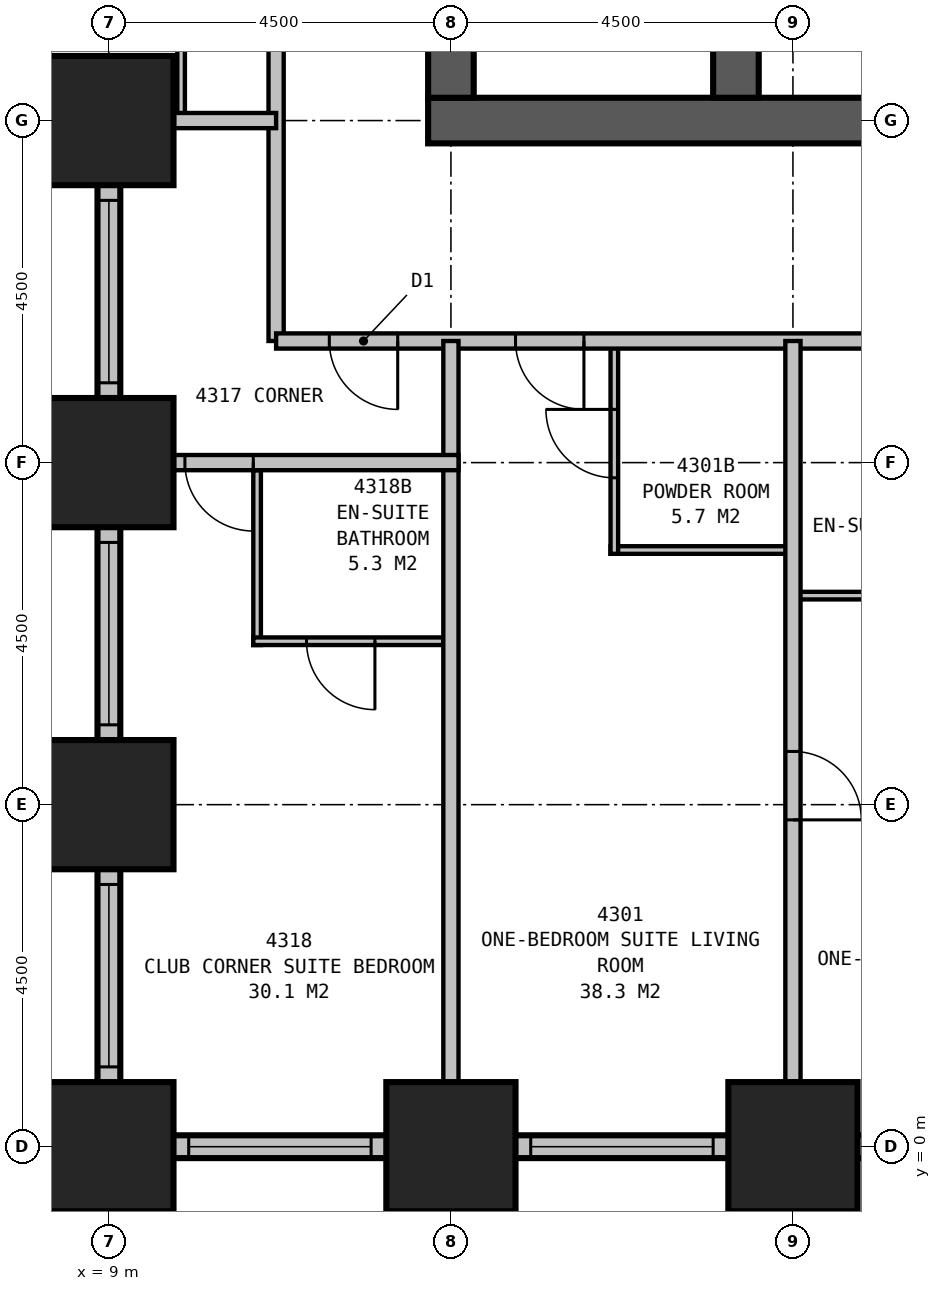
"""IFC4 building model, lengths in metres.
Left out: names, types, materials, properties, quantities, classifications, styles, units other than length and angle.
Written with IfcOpenShell. Run it as: python <this file> out.ifc"""

import sys

from ifc_helpers import new_model, si_unit, direction, frame, frame_2d, origin, origin_2d, place, context, subcontext, project, spatial, rectangle, extrude, element, fill, save


model = new_model("IFC4")
c1 = context("Model", 3, precision=1e-05, world=origin(), true_north=direction((0.0, 1.0)))
c2 = subcontext(c1, "Body", "Model", "MODEL_VIEW")
j1 = project(units=[si_unit("LENGTHUNIT", "METRE"), si_unit("PLANEANGLEUNIT", "RADIAN")], contexts=[c1])
p1 = place(None, origin())
s1 = spatial("IfcSite", under=j1, at=p1, CompositionType="ELEMENT")
p2 = place(p1, origin())
s2 = spatial("IfcBuilding", under=s1, at=p2, CompositionType="ELEMENT")
p3 = place(p2, frame((0.0, 0.0, 169.4)))
s3 = spatial("IfcBuildingStorey", under=s2, at=p3, CompositionType="ELEMENT", Elevation=169.4)
for number, where, z_axis, x_axis in (
    (1, (9.0, 13.5, 0.0), (0.0, 0.0, 1.0), (1.0, 0.0, 0.0)),
    (2, (9.0, 9.0, 0.0), (0.0, 0.0, 1.0), (1.0, 0.0, 0.0)),
    (3, (9.0, 4.5, 0.0), (0.0, 0.0, 1.0), (1.0, 0.0, 0.0)),
    (4, (9.0, 0.0, 0.0), (0.0, 0.0, 1.0), (1.0, 0.0, 0.0)),
    (5, (13.5, 0.0, 0.0), (0.0, 0.0, 1.0), (1.0, 0.0, 0.0)),
    (6, (18.0, 0.0, 0.0), (0.0, 0.0, 1.0), (1.0, 0.0, 0.0)),
):
    element("IfcColumn", number, at=place(p3, frame(where, z_axis=z_axis, x_axis=x_axis)), inside=s3, PredefinedType="COLUMN", context=c2, shape_type="SweptSolid", body=[
        extrude(rectangle(XDim=1.7, YDim=1.7, at=origin_2d()), origin(), (0.0, 0.0, 1.0), 3.5),
    ])
p4 = place(p3, frame((13.2, 13.5, 0.0), z_axis=(0.0, 0.0, 1.0), x_axis=(1.0, 0.0, 0.0)))
e7 = element("IfcWall", 7, at=p4, inside=s3, PredefinedType="SHEAR", context=c2, shape_type="SweptSolid", body=[
    extrude(rectangle(XDim=23.1, YDim=0.6, at=frame_2d((11.55, 0.0))), origin(), (0.0, 0.0, 1.0), 3.5),
])
p5 = place(p3, frame((17.25, 13.8, 0.0), z_axis=(0.0, 0.0, 1.0), x_axis=(0.0, 1.0, 0.0)))
e8 = element("IfcWall", 8, at=p5, inside=s3, PredefinedType="SHEAR", context=c2, shape_type="SweptSolid", body=[
    extrude(rectangle(XDim=12.9, YDim=0.6, at=frame_2d((6.45, 0.0))), origin(), (0.0, 0.0, 1.0), 3.5),
])
p6 = place(p5, frame((3.85, 0.0, 0.0)))
e9 = element("IfcOpeningElement", 9, at=p6, cuts=e8, PredefinedType="OPENING", context=c2, shape_type="SweptSolid", body=[
    extrude(rectangle(XDim=1.2, YDim=2.1, at=frame_2d((0.6, 1.05))), frame((0.0, 0.31, 0.0), z_axis=(0.0, -1.0, 0.0), x_axis=(1.0, 0.0, 0.0)), (0.0, 0.0, 1.0), 0.62),
])
p7 = place(p3, frame((13.5, 16.5, 0.0), z_axis=(0.0, 0.0, 1.0), x_axis=(0.0, -1.0, 0.0)))
e10 = element("IfcWall", 10, at=p7, inside=s3, PredefinedType="SHEAR", context=c2, shape_type="SweptSolid", body=[
    extrude(rectangle(XDim=2.7, YDim=0.6, at=frame_2d((1.35, 0.0))), origin(), (0.0, 0.0, 1.0), 3.5),
])
p8 = place(p3, frame((1.35, 13.5, 0.0), z_axis=(0.0, 0.0, 1.0), x_axis=(1.0, 0.0, 0.0)))
e11 = element("IfcWall", 11, at=p8, inside=s3, PredefinedType="STANDARD", context=c2, shape_type="SweptSolid", body=[
    extrude(rectangle(XDim=7.8, YDim=0.3, at=frame_2d((3.9, 0.0))), origin(), (0.0, 0.0, 1.0), 2.25),
])
p9 = place(p8, frame((1.2, 0.0, 0.5)))
e12 = element("IfcOpeningElement", 12, at=p9, cuts=e11, PredefinedType="OPENING", context=c2, shape_type="SweptSolid", body=[
    extrude(rectangle(XDim=0.9, YDim=1.6, at=frame_2d((0.45, 0.8))), frame((0.0, 0.16, 0.0), z_axis=(0.0, -1.0, 0.0), x_axis=(1.0, 0.0, 0.0)), (0.0, 0.0, 1.0), 0.32),
])
p10 = place(p3, frame((9.0, 13.65, 0.0), z_axis=(0.0, 0.0, 1.0), x_axis=(0.0, -1.0, 0.0)))
e13 = element("IfcWall", 13, at=p10, inside=s3, PredefinedType="STANDARD", context=c2, shape_type="SweptSolid", body=[
    extrude(rectangle(XDim=13.8, YDim=0.3, at=frame_2d((6.9, 0.0))), origin(), (0.0, 0.0, 1.0), 2.25),
])
p11 = place(p10, frame((1.2, 0.0, 0.5)))
e14 = element("IfcOpeningElement", 14, at=p11, cuts=e13, PredefinedType="OPENING", context=c2, shape_type="SweptSolid", body=[
    extrude(rectangle(XDim=2.4, YDim=1.6, at=frame_2d((1.2, 0.8))), frame((0.0, 0.16, 0.0), z_axis=(0.0, -1.0, 0.0), x_axis=(1.0, 0.0, 0.0)), (0.0, 0.0, 1.0), 0.32),
])
p12 = place(p10, frame((5.7, 0.0, 0.5)))
e15 = element("IfcOpeningElement", 15, at=p12, cuts=e13, PredefinedType="OPENING", context=c2, shape_type="SweptSolid", body=[
    extrude(rectangle(XDim=2.4, YDim=1.6, at=frame_2d((1.2, 0.8))), frame((0.0, 0.16, 0.0), z_axis=(0.0, -1.0, 0.0), x_axis=(1.0, 0.0, 0.0)), (0.0, 0.0, 1.0), 0.32),
])
p13 = place(p10, frame((10.2, 0.0, 0.5)))
e16 = element("IfcOpeningElement", 16, at=p13, cuts=e13, PredefinedType="OPENING", context=c2, shape_type="SweptSolid", body=[
    extrude(rectangle(XDim=2.4, YDim=1.6, at=frame_2d((1.2, 0.8))), frame((0.0, 0.16, 0.0), z_axis=(0.0, -1.0, 0.0), x_axis=(1.0, 0.0, 0.0)), (0.0, 0.0, 1.0), 0.32),
])
p14 = place(p3, frame((8.85, 0.0, 0.0), z_axis=(0.0, 0.0, 1.0), x_axis=(1.0, 0.0, 0.0)))
e17 = element("IfcWall", 17, at=p14, inside=s3, PredefinedType="STANDARD", context=c2, shape_type="SweptSolid", body=[
    extrude(rectangle(XDim=36.3, YDim=0.3, at=frame_2d((18.15, 0.0))), origin(), (0.0, 0.0, 1.0), 2.25),
])
p15 = place(p14, frame((1.2, 0.0, 0.5)))
e18 = element("IfcOpeningElement", 18, at=p15, cuts=e17, PredefinedType="OPENING", context=c2, shape_type="SweptSolid", body=[
    extrude(rectangle(XDim=2.4, YDim=1.6, at=frame_2d((1.2, 0.8))), frame((0.0, 0.16, 0.0), z_axis=(0.0, -1.0, 0.0), x_axis=(1.0, 0.0, 0.0)), (0.0, 0.0, 1.0), 0.32),
])
p16 = place(p14, frame((5.7, 0.0, 0.5)))
e19 = element("IfcOpeningElement", 19, at=p16, cuts=e17, PredefinedType="OPENING", context=c2, shape_type="SweptSolid", body=[
    extrude(rectangle(XDim=2.4, YDim=1.6, at=frame_2d((1.2, 0.8))), frame((0.0, 0.16, 0.0), z_axis=(0.0, -1.0, 0.0), x_axis=(1.0, 0.0, 0.0)), (0.0, 0.0, 1.0), 0.32),
])
p17 = place(p14, frame((10.2, 0.0, 0.5)))
e20 = element("IfcOpeningElement", 20, at=p17, cuts=e17, PredefinedType="OPENING", context=c2, shape_type="SweptSolid", body=[
    extrude(rectangle(XDim=2.4, YDim=1.6, at=frame_2d((1.2, 0.8))), frame((0.0, 0.16, 0.0), z_axis=(0.0, -1.0, 0.0), x_axis=(1.0, 0.0, 0.0)), (0.0, 0.0, 1.0), 0.32),
])
p18 = place(p14, frame((14.7, 0.0, 0.5)))
e21 = element("IfcOpeningElement", 21, at=p18, cuts=e17, PredefinedType="OPENING", context=c2, shape_type="SweptSolid", body=[
    extrude(rectangle(XDim=2.4, YDim=1.6, at=frame_2d((1.2, 0.8))), frame((0.0, 0.16, 0.0), z_axis=(0.0, -1.0, 0.0), x_axis=(1.0, 0.0, 0.0)), (0.0, 0.0, 1.0), 0.32),
])
p19 = place(p14, frame((19.2, 0.0, 0.5)))
e22 = element("IfcOpeningElement", 22, at=p19, cuts=e17, PredefinedType="OPENING", context=c2, shape_type="SweptSolid", body=[
    extrude(rectangle(XDim=2.4, YDim=1.6, at=frame_2d((1.2, 0.8))), frame((0.0, 0.16, 0.0), z_axis=(0.0, -1.0, 0.0), x_axis=(1.0, 0.0, 0.0)), (0.0, 0.0, 1.0), 0.32),
])
p20 = place(p14, frame((23.7, 0.0, 0.5)))
e23 = element("IfcOpeningElement", 23, at=p20, cuts=e17, PredefinedType="OPENING", context=c2, shape_type="SweptSolid", body=[
    extrude(rectangle(XDim=2.4, YDim=1.6, at=frame_2d((1.2, 0.8))), frame((0.0, 0.16, 0.0), z_axis=(0.0, -1.0, 0.0), x_axis=(1.0, 0.0, 0.0)), (0.0, 0.0, 1.0), 0.32),
])
p21 = place(p14, frame((28.2, 0.0, 0.5)))
e24 = element("IfcOpeningElement", 24, at=p21, cuts=e17, PredefinedType="OPENING", context=c2, shape_type="SweptSolid", body=[
    extrude(rectangle(XDim=2.4, YDim=1.6, at=frame_2d((1.2, 0.8))), frame((0.0, 0.16, 0.0), z_axis=(0.0, -1.0, 0.0), x_axis=(1.0, 0.0, 0.0)), (0.0, 0.0, 1.0), 0.32),
])
p22 = place(p14, frame((32.7, 0.0, 0.5)))
e25 = element("IfcOpeningElement", 25, at=p22, cuts=e17, PredefinedType="OPENING", context=c2, shape_type="SweptSolid", body=[
    extrude(rectangle(XDim=2.4, YDim=1.6, at=frame_2d((1.2, 0.8))), frame((0.0, 0.16, 0.0), z_axis=(0.0, -1.0, 0.0), x_axis=(1.0, 0.0, 0.0)), (0.0, 0.0, 1.0), 0.32),
])
p23 = place(p3, frame((11.2, 10.6, 0.0), z_axis=(0.0, 0.0, 1.0), x_axis=(1.0, 0.0, 0.0)))
e26 = element("IfcWall", 26, at=p23, inside=s3, PredefinedType="PARTITIONING", context=c2, shape_type="SweptSolid", body=[
    extrude(rectangle(XDim=27.1, YDim=0.2, at=frame_2d((13.55, 0.0))), origin(), (0.0, 0.0, 1.0), 3.25),
])
p24 = place(p23, frame((4.05, 0.0, 0.0), z_axis=(0.0, 0.0, 1.0), x_axis=(-1.0, 0.0, 0.0)))
e27 = element("IfcOpeningElement", 27, at=p24, cuts=e26, PredefinedType="OPENING", context=c2, shape_type="SweptSolid", body=[
    extrude(rectangle(XDim=0.9, YDim=2.1, at=frame_2d((0.45, 1.05))), frame((0.0, 0.11, 0.0), z_axis=(0.0, -1.0, 0.0), x_axis=(1.0, 0.0, 0.0)), (0.0, 0.0, 1.0), 0.22),
])
p25 = place(p23, frame((12.65, 0.0, 0.0), z_axis=(0.0, 0.0, 1.0), x_axis=(-1.0, 0.0, 0.0)))
e28 = element("IfcOpeningElement", 28, at=p25, cuts=e26, PredefinedType="OPENING", context=c2, shape_type="SweptSolid", body=[
    extrude(rectangle(XDim=1.0, YDim=2.1, at=frame_2d((0.5, 1.05))), frame((0.0, 0.11, 0.0), z_axis=(0.0, -1.0, 0.0), x_axis=(1.0, 0.0, 0.0)), (0.0, 0.0, 1.0), 0.22),
])
p26 = place(p23, frame((17.55, 0.0, 0.0), z_axis=(0.0, 0.0, 1.0), x_axis=(-1.0, 0.0, 0.0)))
e29 = element("IfcOpeningElement", 29, at=p26, cuts=e26, PredefinedType="OPENING", context=c2, shape_type="SweptSolid", body=[
    extrude(rectangle(XDim=0.9, YDim=2.1, at=frame_2d((0.45, 1.05))), frame((0.0, 0.11, 0.0), z_axis=(0.0, -1.0, 0.0), x_axis=(1.0, 0.0, 0.0)), (0.0, 0.0, 1.0), 0.22),
])
p27 = place(p23, frame((1.6, 0.0, 0.0), z_axis=(0.0, 0.0, 1.0), x_axis=(-1.0, 0.0, 0.0)))
e30 = element("IfcOpeningElement", 30, at=p27, cuts=e26, PredefinedType="OPENING", context=c2, shape_type="SweptSolid", body=[
    extrude(rectangle(XDim=0.9, YDim=2.1, at=frame_2d((0.45, 1.05))), frame((0.0, 0.11, 0.0), z_axis=(0.0, -1.0, 0.0), x_axis=(1.0, 0.0, 0.0)), (0.0, 0.0, 1.0), 0.22),
])
p28 = place(p23, frame((26.4, 0.0, 0.0), z_axis=(0.0, 0.0, 1.0), x_axis=(-1.0, 0.0, 0.0)))
e31 = element("IfcOpeningElement", 31, at=p28, cuts=e26, PredefinedType="OPENING", context=c2, shape_type="SweptSolid", body=[
    extrude(rectangle(XDim=0.9, YDim=2.1, at=frame_2d((0.45, 1.05))), frame((0.0, 0.11, 0.0), z_axis=(0.0, -1.0, 0.0), x_axis=(1.0, 0.0, 0.0)), (0.0, 0.0, 1.0), 0.22),
])
p29 = place(p3, frame((11.2, 10.6, 0.0), z_axis=(0.0, 0.0, 1.0), x_axis=(0.0, 1.0, 0.0)))
e32 = element("IfcWall", 32, at=p29, inside=s3, PredefinedType="PARTITIONING", context=c2, shape_type="SweptSolid", body=[
    extrude(rectangle(XDim=18.7, YDim=0.2, at=frame_2d((9.35, 0.0))), origin(), (0.0, 0.0, 1.0), 3.25),
])
p30 = place(p29, frame((6.05, 0.0, 0.0)))
e33 = element("IfcOpeningElement", 33, at=p30, cuts=e32, PredefinedType="OPENING", context=c2, shape_type="SweptSolid", body=[
    extrude(rectangle(XDim=0.9, YDim=2.1, at=frame_2d((0.45, 1.05))), frame((0.0, 0.11, 0.0), z_axis=(0.0, -1.0, 0.0), x_axis=(1.0, 0.0, 0.0)), (0.0, 0.0, 1.0), 0.22),
])
p31 = place(p29, frame((10.55, 0.0, 0.0)))
e34 = element("IfcOpeningElement", 34, at=p31, cuts=e32, PredefinedType="OPENING", context=c2, shape_type="SweptSolid", body=[
    extrude(rectangle(XDim=0.9, YDim=2.1, at=frame_2d((0.45, 1.05))), frame((0.0, 0.11, 0.0), z_axis=(0.0, -1.0, 0.0), x_axis=(1.0, 0.0, 0.0)), (0.0, 0.0, 1.0), 0.22),
])
p32 = place(p29, frame((14.65, 0.0, 0.0)))
e35 = element("IfcOpeningElement", 35, at=p32, cuts=e32, PredefinedType="OPENING", context=c2, shape_type="SweptSolid", body=[
    extrude(rectangle(XDim=1.0, YDim=2.1, at=frame_2d((0.5, 1.05))), frame((0.0, 0.11, 0.0), z_axis=(0.0, -1.0, 0.0), x_axis=(1.0, 0.0, 0.0)), (0.0, 0.0, 1.0), 0.22),
])
p33 = place(p3, frame((18.0, 10.6, 0.0), z_axis=(0.0, 0.0, 1.0), x_axis=(0.0, -1.0, 0.0)))
e36 = element("IfcWall", 36, at=p33, inside=s3, PredefinedType="PARTITIONING", context=c2, shape_type="SweptSolid", body=[
    extrude(rectangle(XDim=10.6, YDim=0.2, at=frame_2d((5.3, 0.0))), origin(), (0.0, 0.0, 1.0), 2.25),
])
p34 = place(p33, frame((5.4, 0.0, 0.0)))
e37 = element("IfcOpeningElement", 37, at=p34, cuts=e36, PredefinedType="OPENING", context=c2, shape_type="SweptSolid", body=[
    extrude(rectangle(XDim=0.9, YDim=2.1, at=frame_2d((0.45, 1.05))), frame((0.0, 0.11, 0.0), z_axis=(0.0, -1.0, 0.0), x_axis=(1.0, 0.0, 0.0)), (0.0, 0.0, 1.0), 0.22),
])
p35 = place(p3, frame((15.6, 7.85, 0.0), z_axis=(0.0, 0.0, 1.0), x_axis=(1.0, 0.0, 0.0)))
e38 = element("IfcWall", 38, at=p35, inside=s3, PredefinedType="PLUMBINGWALL", context=c2, shape_type="SweptSolid", body=[
    extrude(rectangle(XDim=2.4, YDim=0.1, at=frame_2d((1.2, 0.0))), origin(), (0.0, 0.0, 1.0), 3.25),
])
p36 = place(p3, frame((15.65, 10.6, 0.0), z_axis=(0.0, 0.0, 1.0), x_axis=(0.0, -1.0, 0.0)))
e39 = element("IfcWall", 39, at=p36, inside=s3, PredefinedType="PLUMBINGWALL", context=c2, shape_type="SweptSolid", body=[
    extrude(rectangle(XDim=2.8, YDim=0.1, at=frame_2d((1.4, 0.0))), origin(), (0.0, 0.0, 1.0), 3.25),
])
p37 = place(p36, frame((1.8, 0.0, 0.0), z_axis=(0.0, 0.0, 1.0), x_axis=(-1.0, 0.0, 0.0)))
e40 = element("IfcOpeningElement", 40, at=p37, cuts=e39, PredefinedType="OPENING", context=c2, shape_type="SweptSolid", body=[
    extrude(rectangle(XDim=0.9, YDim=2.1, at=frame_2d((0.45, 1.05))), frame((0.0, 0.06, 0.0), z_axis=(0.0, -1.0, 0.0), x_axis=(1.0, 0.0, 0.0)), (0.0, 0.0, 1.0), 0.12),
])
p38 = place(p3, frame((18.0, 7.25, 0.0), z_axis=(0.0, 0.0, 1.0), x_axis=(1.0, 0.0, 0.0)))
e41 = element("IfcWall", 41, at=p38, inside=s3, PredefinedType="PLUMBINGWALL", context=c2, shape_type="SweptSolid", body=[
    extrude(rectangle(XDim=3.15, YDim=0.1, at=frame_2d((1.575, 0.0))), origin(), (0.0, 0.0, 1.0), 3.25),
])
p39 = place(p3, frame((9.95, 13.5, 0.0), z_axis=(0.0, 0.0, 1.0), x_axis=(0.0, 1.0, 0.0)))
e42 = element("IfcWall", 42, at=p39, inside=s3, PredefinedType="PLUMBINGWALL", context=c2, shape_type="SweptSolid", body=[
    extrude(rectangle(XDim=2.8, YDim=0.1, at=frame_2d((1.4, 0.0))), origin(), (0.0, 0.0, 1.0), 3.25),
])
p40 = place(p3, frame((11.2, 13.5, 0.0), z_axis=(0.0, 0.0, 1.0), x_axis=(-1.0, 0.0, 0.0)))
e43 = element("IfcWall", 43, at=p40, inside=s3, PredefinedType="PARTITIONING", context=c2, shape_type="SweptSolid", body=[
    extrude(rectangle(XDim=2.2, YDim=0.2, at=frame_2d((1.1, 0.0))), origin(), (0.0, 0.0, 1.0), 1.95),
])
p41 = place(p3, frame((13.5, 10.6, 0.0), z_axis=(0.0, 0.0, 1.0), x_axis=(0.0, -1.0, 0.0)))
e44 = element("IfcWall", 44, at=p41, inside=s3, PredefinedType="PARTITIONING", context=c2, shape_type="SweptSolid", body=[
    extrude(rectangle(XDim=10.6, YDim=0.2, at=frame_2d((5.3, 0.0))), origin(), (0.0, 0.0, 1.0), 2.25),
])
p42 = place(p3, frame((13.6, 9.0, 0.0), z_axis=(0.0, 0.0, 1.0), x_axis=(-1.0, 0.0, 0.0)))
e45 = element("IfcWall", 45, at=p42, inside=s3, PredefinedType="PARTITIONING", context=c2, shape_type="SweptSolid", body=[
    extrude(rectangle(XDim=4.6, YDim=0.2, at=frame_2d((2.3, 0.0))), origin(), (0.0, 0.0, 1.0), 3.25),
])
p43 = place(p42, frame((2.7, 0.0, 0.0)))
e46 = element("IfcOpeningElement", 46, at=p43, cuts=e45, PredefinedType="OPENING", context=c2, shape_type="SweptSolid", body=[
    extrude(rectangle(XDim=0.9, YDim=2.1, at=frame_2d((0.45, 1.05))), frame((0.0, 0.11, 0.0), z_axis=(0.0, -1.0, 0.0), x_axis=(1.0, 0.0, 0.0)), (0.0, 0.0, 1.0), 0.22),
])
p44 = place(p3, frame((10.95, 8.9, 0.0), z_axis=(0.0, 0.0, 1.0), x_axis=(0.0, -1.0, 0.0)))
e47 = element("IfcWall", 47, at=p44, inside=s3, PredefinedType="PLUMBINGWALL", context=c2, shape_type="SweptSolid", body=[
    extrude(rectangle(XDim=2.3, YDim=0.1, at=frame_2d((1.15, 0.0))), origin(), (0.0, 0.0, 1.0), 3.25),
])
p45 = place(p3, frame((13.4, 6.65, 0.0), z_axis=(0.0, 0.0, 1.0), x_axis=(-1.0, 0.0, 0.0)))
e48 = element("IfcWall", 48, at=p45, inside=s3, PredefinedType="PLUMBINGWALL", context=c2, shape_type="SweptSolid", body=[
    extrude(rectangle(XDim=2.5, YDim=0.1, at=frame_2d((1.25, 0.0))), origin(), (0.0, 0.0, 1.0), 3.25),
])
p46 = place(p45, frame((0.9, 0.0, 0.0)))
e49 = element("IfcOpeningElement", 49, at=p46, cuts=e48, PredefinedType="OPENING", context=c2, shape_type="SweptSolid", body=[
    extrude(rectangle(XDim=0.9, YDim=2.1, at=frame_2d((0.45, 1.05))), frame((0.0, 0.06, 0.0), z_axis=(0.0, -1.0, 0.0), x_axis=(1.0, 0.0, 0.0)), (0.0, 0.0, 1.0), 0.12),
])
p47 = place(p11, origin())
e50 = element("IfcWindow", 50, at=p47, inside=s3, PartitioningType="SINGLE_PANEL", PredefinedType="WINDOW", context=c2, shape_type="SweptSolid", body=[
    extrude(rectangle(XDim=2.4, YDim=1.6, at=frame_2d((1.2, 0.8))), frame((0.0, 0.03, 0.0), z_axis=(0.0, -1.0, 0.0), x_axis=(1.0, 0.0, 0.0)), (0.0, 0.0, 1.0), 0.06),
])
fill(e14, e50)
p48 = place(p12, origin())
e51 = element("IfcWindow", 51, at=p48, inside=s3, PartitioningType="SINGLE_PANEL", PredefinedType="WINDOW", context=c2, shape_type="SweptSolid", body=[
    extrude(rectangle(XDim=2.4, YDim=1.6, at=frame_2d((1.2, 0.8))), frame((0.0, 0.03, 0.0), z_axis=(0.0, -1.0, 0.0), x_axis=(1.0, 0.0, 0.0)), (0.0, 0.0, 1.0), 0.06),
])
fill(e15, e51)
p49 = place(p13, origin())
e52 = element("IfcWindow", 52, at=p49, inside=s3, PartitioningType="SINGLE_PANEL", PredefinedType="WINDOW", context=c2, shape_type="SweptSolid", body=[
    extrude(rectangle(XDim=2.4, YDim=1.6, at=frame_2d((1.2, 0.8))), frame((0.0, 0.03, 0.0), z_axis=(0.0, -1.0, 0.0), x_axis=(1.0, 0.0, 0.0)), (0.0, 0.0, 1.0), 0.06),
])
fill(e16, e52)
p50 = place(p15, origin())
e53 = element("IfcWindow", 53, at=p50, inside=s3, PartitioningType="SINGLE_PANEL", PredefinedType="WINDOW", context=c2, shape_type="SweptSolid", body=[
    extrude(rectangle(XDim=2.4, YDim=1.6, at=frame_2d((1.2, 0.8))), frame((0.0, 0.03, 0.0), z_axis=(0.0, -1.0, 0.0), x_axis=(1.0, 0.0, 0.0)), (0.0, 0.0, 1.0), 0.06),
])
fill(e18, e53)
p51 = place(p16, origin())
e54 = element("IfcWindow", 54, at=p51, inside=s3, PartitioningType="SINGLE_PANEL", PredefinedType="WINDOW", context=c2, shape_type="SweptSolid", body=[
    extrude(rectangle(XDim=2.4, YDim=1.6, at=frame_2d((1.2, 0.8))), frame((0.0, 0.03, 0.0), z_axis=(0.0, -1.0, 0.0), x_axis=(1.0, 0.0, 0.0)), (0.0, 0.0, 1.0), 0.06),
])
fill(e19, e54)
p52 = place(p24, origin())
e55 = element("IfcDoor", 55, at=p52, inside=s3, OperationType="SINGLE_SWING_LEFT", PredefinedType="DOOR", context=c2, shape_type="SweptSolid", body=[
    extrude(rectangle(XDim=0.9, YDim=2.1, at=frame_2d((0.45, 1.05))), frame((0.0, 0.025, 0.0), z_axis=(0.0, -1.0, 0.0), x_axis=(1.0, 0.0, 0.0)), (0.0, 0.0, 1.0), 0.05),
])
fill(e27, e55)
p53 = place(p27, origin())
e56 = element("IfcDoor", 56, at=p53, inside=s3, OperationType="SINGLE_SWING_LEFT", PredefinedType="DOOR", context=c2, shape_type="SweptSolid", body=[
    extrude(rectangle(XDim=0.9, YDim=2.1, at=frame_2d((0.45, 1.05))), frame((0.0, 0.025, 0.0), z_axis=(0.0, -1.0, 0.0), x_axis=(1.0, 0.0, 0.0)), (0.0, 0.0, 1.0), 0.05),
])
fill(e30, e56)
p54 = place(p34, origin())
e57 = element("IfcDoor", 57, at=p54, inside=s3, OperationType="SINGLE_SWING_RIGHT", PredefinedType="DOOR", context=c2, shape_type="SweptSolid", body=[
    extrude(rectangle(XDim=0.9, YDim=2.1, at=frame_2d((0.45, 1.05))), frame((0.0, 0.025, 0.0), z_axis=(0.0, -1.0, 0.0), x_axis=(1.0, 0.0, 0.0)), (0.0, 0.0, 1.0), 0.05),
])
fill(e37, e57)
p55 = place(p37, origin())
e58 = element("IfcDoor", 58, at=p55, inside=s3, OperationType="SINGLE_SWING_RIGHT", PredefinedType="DOOR", context=c2, shape_type="SweptSolid", body=[
    extrude(rectangle(XDim=0.9, YDim=2.1, at=frame_2d((0.45, 1.05))), frame((0.0, 0.025, 0.0), z_axis=(0.0, -1.0, 0.0), x_axis=(1.0, 0.0, 0.0)), (0.0, 0.0, 1.0), 0.05),
])
fill(e40, e58)
p56 = place(p43, origin())
e59 = element("IfcDoor", 59, at=p56, inside=s3, OperationType="SINGLE_SWING_LEFT", PredefinedType="DOOR", context=c2, shape_type="SweptSolid", body=[
    extrude(rectangle(XDim=0.9, YDim=2.1, at=frame_2d((0.45, 1.05))), frame((0.0, 0.025, 0.0), z_axis=(0.0, -1.0, 0.0), x_axis=(1.0, 0.0, 0.0)), (0.0, 0.0, 1.0), 0.05),
])
fill(e46, e59)
p57 = place(p46, origin())
e60 = element("IfcDoor", 60, at=p57, inside=s3, OperationType="SINGLE_SWING_LEFT", PredefinedType="DOOR", context=c2, shape_type="SweptSolid", body=[
    extrude(rectangle(XDim=0.9, YDim=2.1, at=frame_2d((0.45, 1.05))), frame((0.0, 0.025, 0.0), z_axis=(0.0, -1.0, 0.0), x_axis=(1.0, 0.0, 0.0)), (0.0, 0.0, 1.0), 0.05),
])
fill(e49, e60)
save(model, sys.argv[1])
